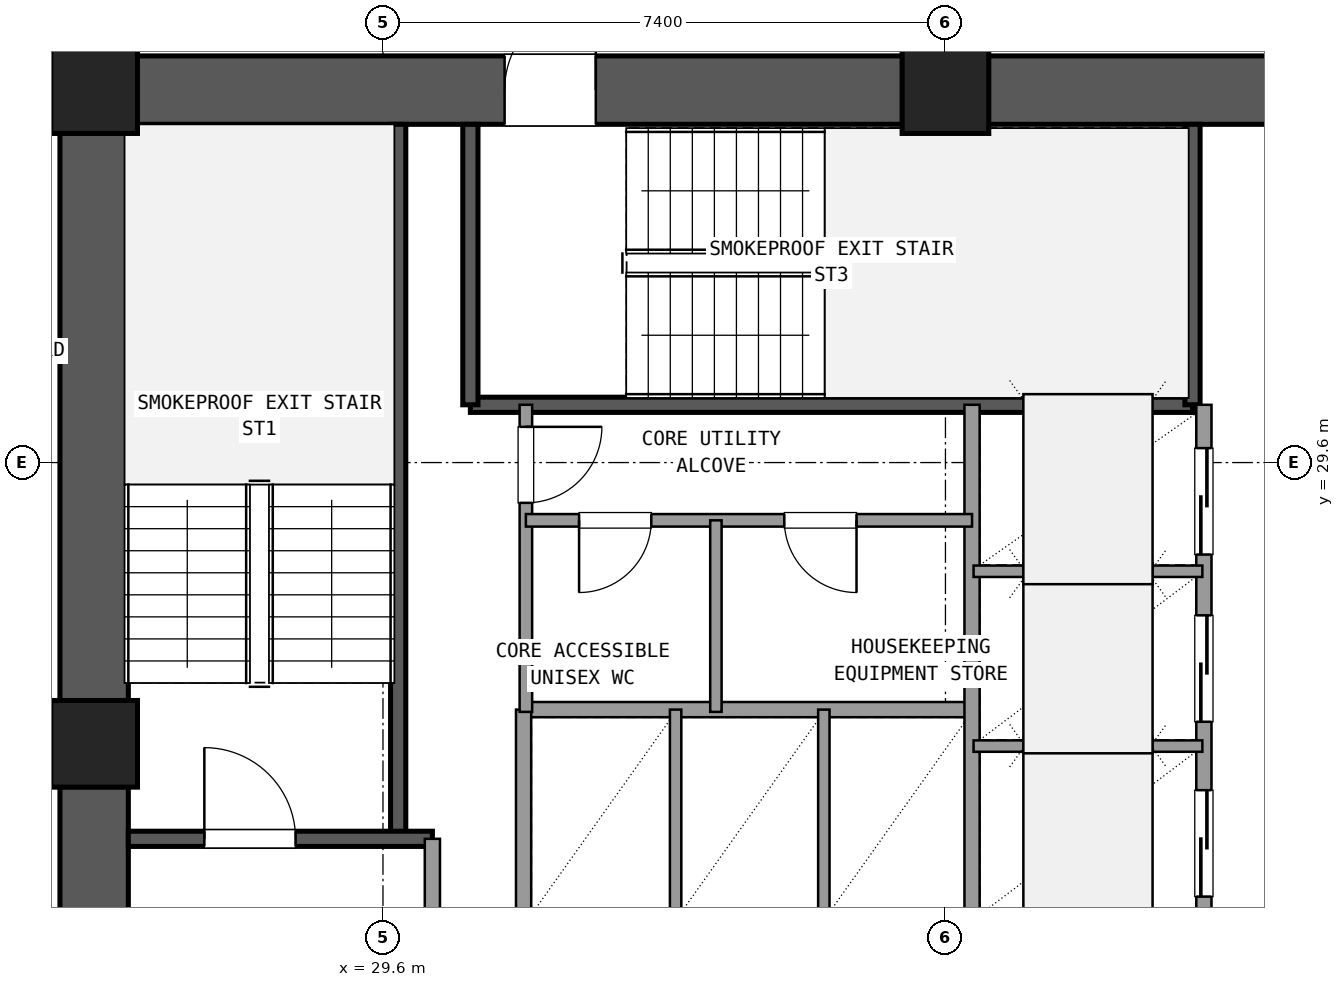
"""IFC4 building model, lengths in metres.
Left out: names, types, materials, properties, quantities, classifications, styles, units other than length and angle.
Written with IfcOpenShell. Run it as: python <this file> out.ifc"""

import sys

from ifc_helpers import new_model, si_unit, direction, frame, frame_2d, origin, origin_2d, place, context, subcontext, project, spatial, rectangle, extrude, element, fill, save


model = new_model("IFC4")
c1 = context("Model", 3, precision=1e-05, world=origin(), true_north=direction((0.0, 1.0)))
c2 = subcontext(c1, "Body", "Model", "MODEL_VIEW")
j1 = project(units=[si_unit("LENGTHUNIT", "METRE"), si_unit("PLANEANGLEUNIT", "RADIAN")], contexts=[c1])
p1 = place(None, origin())
s1 = spatial("IfcSite", under=j1, at=p1, CompositionType="ELEMENT")
p2 = place(p1, origin())
s2 = spatial("IfcBuilding", under=s1, at=p2, CompositionType="ELEMENT")
p3 = place(p2, frame((0.0, 0.0, 59.94)))
s3 = spatial("IfcBuildingStorey", under=s2, at=p3, CompositionType="ELEMENT", Elevation=59.94)
for number, where, z_axis, x_axis in (
    (1, (37.0, 34.5, 0.0), (0.0, 0.0, 1.0), (1.0, 0.0, 0.0)),
    (2, (25.8, 34.5, 0.0), (0.0, 0.0, 1.0), (1.0, 0.0, 0.0)),
    (3, (25.8, 25.9, 0.0), (0.0, 0.0, 1.0), (1.0, 0.0, 0.0)),
):
    element("IfcColumn", number, at=place(p3, frame(where, z_axis=z_axis, x_axis=x_axis)), inside=s3, PredefinedType="COLUMN", context=c2, shape_type="SweptSolid", body=[
        extrude(rectangle(XDim=1.14, YDim=1.14, at=origin_2d()), origin(), (0.0, 0.0, 1.0), 3.6),
    ])
p4 = place(p3, frame((47.635, 34.5, 0.0), z_axis=(0.0, 0.0, 1.0), x_axis=(-1.0, 0.0, 0.0)))
e4 = element("IfcWall", 4, at=p4, inside=s3, PredefinedType="SHEAR", context=c2, shape_type="SweptSolid", body=[
    extrude(rectangle(XDim=10.07, YDim=0.9, at=frame_2d((5.035, 0.0))), origin(), (0.0, 0.0, 1.0), 3.32),
])
p5 = place(p4, frame((4.535, 0.0, 0.0)))
e5 = element("IfcOpeningElement", 5, at=p5, cuts=e4, PredefinedType="OPENING", context=c2, shape_type="SweptSolid", body=[
    extrude(rectangle(XDim=1.6, YDim=2.2, at=frame_2d((0.8, 1.1))), frame((0.0, 0.46, 0.0), z_axis=(0.0, -1.0, 0.0), x_axis=(1.0, 0.0, 0.0)), (0.0, 0.0, 1.0), 0.92),
])
p6 = place(p3, frame((36.435, 34.5, 0.0), z_axis=(0.0, 0.0, 1.0), x_axis=(-1.0, 0.0, 0.0)))
e6 = element("IfcWall", 6, at=p6, inside=s3, PredefinedType="SHEAR", context=c2, shape_type="SweptSolid", body=[
    extrude(rectangle(XDim=10.07, YDim=0.9, at=frame_2d((5.035, 0.0))), origin(), (0.0, 0.0, 1.0), 3.32),
])
p7 = place(p6, frame((4.035, 0.0, 0.0)))
e7 = element("IfcOpeningElement", 7, at=p7, cuts=e6, PredefinedType="OPENING", context=c2, shape_type="SweptSolid", body=[
    extrude(rectangle(XDim=1.2, YDim=2.15, at=frame_2d((0.6, 1.075))), frame((0.0, 0.46, 0.0), z_axis=(0.0, -1.0, 0.0), x_axis=(1.0, 0.0, 0.0)), (0.0, 0.0, 1.0), 0.92),
])
p8 = place(p3, frame((25.8, 33.935, 0.0), z_axis=(0.0, 0.0, 1.0), x_axis=(0.0, -1.0, 0.0)))
e8 = element("IfcWall", 8, at=p8, inside=s3, PredefinedType="SHEAR", context=c2, shape_type="SweptSolid", body=[
    extrude(rectangle(XDim=7.47, YDim=0.9, at=frame_2d((3.735, 0.0))), origin(), (0.0, 0.0, 1.0), 3.32),
])
p9 = place(p3, frame((25.8, 25.335, 0.0), z_axis=(0.0, 0.0, 1.0), x_axis=(0.0, -1.0, 0.0)))
e9 = element("IfcWall", 9, at=p9, inside=s3, PredefinedType="SHEAR", context=c2, shape_type="SweptSolid", body=[
    extrude(rectangle(XDim=7.47, YDim=0.9, at=frame_2d((3.735, 0.0))), origin(), (0.0, 0.0, 1.0), 3.32),
])
p10 = place(p9, frame((2.085, 0.0, 0.0)))
e10 = element("IfcOpeningElement", 10, at=p10, cuts=e9, PredefinedType="OPENING", context=c2, shape_type="SweptSolid", body=[
    extrude(rectangle(XDim=1.2, YDim=2.15, at=frame_2d((0.6, 1.075))), frame((0.0, 0.46, 0.0), z_axis=(0.0, -1.0, 0.0), x_axis=(1.0, 0.0, 0.0)), (0.0, 0.0, 1.0), 0.92),
])
p11 = place(p3, frame((29.8, 24.65, 0.0), z_axis=(0.0, 0.0, 1.0), x_axis=(0.0, 1.0, 0.0)))
e11 = element("IfcWall", 11, at=p11, inside=s3, PredefinedType="SHEAR", context=c2, shape_type="SweptSolid", body=[
    extrude(rectangle(XDim=9.4, YDim=0.2, at=frame_2d((4.7, 0.0))), origin(), (0.0, 0.0, 1.0), 3.32),
])
p12 = place(p3, frame((26.25, 24.65, 0.0), z_axis=(0.0, 0.0, 1.0), x_axis=(1.0, 0.0, 0.0)))
e12 = element("IfcWall", 12, at=p12, inside=s3, PredefinedType="SHEAR", context=c2, shape_type="SweptSolid", body=[
    extrude(rectangle(XDim=4.0, YDim=0.2, at=frame_2d((2.0, 0.0))), origin(), (0.0, 0.0, 1.0), 3.32),
])
p13 = place(p12, frame((1.0, 0.0, 0.0)))
e13 = element("IfcOpeningElement", 13, at=p13, cuts=e12, PredefinedType="OPENING", context=c2, shape_type="SweptSolid", body=[
    extrude(rectangle(XDim=1.2, YDim=2.15, at=frame_2d((0.6, 1.075))), frame((0.0, 0.11, 0.0), z_axis=(0.0, -1.0, 0.0), x_axis=(1.0, 0.0, 0.0)), (0.0, 0.0, 1.0), 0.22),
])
p14 = place(p3, frame((30.75, 30.36, 0.0), z_axis=(0.0, 0.0, 1.0), x_axis=(1.0, 0.0, 0.0)))
e14 = element("IfcWall", 14, at=p14, inside=s3, PredefinedType="SHEAR", context=c2, shape_type="SweptSolid", body=[
    extrude(rectangle(XDim=9.5, YDim=0.2, at=frame_2d((4.75, 0.0))), origin(), (0.0, 0.0, 1.0), 3.32),
])
for number, where, z_axis, x_axis in (
    (15, (30.75, 30.36, 0.0), (0.0, 0.0, 1.0), (0.0, 1.0, 0.0)),
    (16, (40.25, 30.36, 0.0), (0.0, 0.0, 1.0), (0.0, 1.0, 0.0)),
):
    element("IfcWall", number, at=place(p3, frame(where, z_axis=z_axis, x_axis=x_axis)), inside=s3, PredefinedType="SHEAR", context=c2, shape_type="SweptSolid", body=[
        extrude(rectangle(XDim=3.69, YDim=0.2, at=frame_2d((1.845, 0.0))), origin(), (0.0, 0.0, 1.0), 3.32),
    ])
p15 = place(p3, frame((30.25, 17.75, 0.0), z_axis=(0.0, 0.0, 1.0), x_axis=(0.0, 1.0, 0.0)))
e17 = element("IfcWall", 17, at=p15, inside=s3, PredefinedType="SOLIDWALL", context=c2, shape_type="SweptSolid", body=[
    extrude(rectangle(XDim=6.9, YDim=0.2, at=frame_2d((3.45, 0.0))), origin(), (0.0, 0.0, 1.0), 2.61),
])
p16 = place(p15, frame((4.15, 0.0, 0.0)))
e18 = element("IfcOpeningElement", 18, at=p16, cuts=e17, PredefinedType="OPENING", context=c2, shape_type="SweptSolid", body=[
    extrude(rectangle(XDim=1.2, YDim=2.15, at=frame_2d((0.6, 1.075))), frame((0.0, 0.11, 0.0), z_axis=(0.0, -1.0, 0.0), x_axis=(1.0, 0.0, 0.0)), (0.0, 0.0, 1.0), 0.22),
])
p17 = place(p3, frame((31.45, 26.35, 0.0), z_axis=(0.0, 0.0, 1.0), x_axis=(1.0, 0.0, 0.0)))
e19 = element("IfcWall", 19, at=p17, inside=s3, PredefinedType="SOLIDWALL", context=c2, shape_type="SweptSolid", body=[
    extrude(rectangle(XDim=5.9, YDim=0.2, at=frame_2d((2.95, 0.0))), origin(), (0.0, 0.0, 1.0), 2.61),
])
p18 = place(p3, frame((31.45, 23.54, 0.0), z_axis=(0.0, 0.0, 1.0), x_axis=(0.0, 1.0, 0.0)))
e20 = element("IfcWall", 20, at=p18, inside=s3, PredefinedType="SOLIDWALL", context=c2, shape_type="SweptSolid", body=[
    extrude(rectangle(XDim=2.81, YDim=0.2, at=frame_2d((1.405, 0.0))), origin(), (0.0, 0.0, 1.0), 2.61),
])
for number, where, z_axis, x_axis in (
    (21, (33.45, 23.54, 0.0), (0.0, 0.0, 1.0), (0.0, 1.0, 0.0)),
    (22, (35.4, 23.54, 0.0), (0.0, 0.0, 1.0), (0.0, 1.0, 0.0)),
):
    element("IfcWall", number, at=place(p3, frame(where, z_axis=z_axis, x_axis=x_axis)), inside=s3, PredefinedType="PARTITIONING", context=c2, shape_type="SweptSolid", body=[
        extrude(rectangle(XDim=2.81, YDim=0.15, at=frame_2d((1.405, 0.0))), origin(), (0.0, 0.0, 1.0), 2.61),
    ])
p19 = place(p3, frame((37.35, 23.54, 0.0), z_axis=(0.0, 0.0, 1.0), x_axis=(0.0, 1.0, 0.0)))
e23 = element("IfcWall", 23, at=p19, inside=s3, PredefinedType="SOLIDWALL", context=c2, shape_type="SweptSolid", body=[
    extrude(rectangle(XDim=6.82, YDim=0.2, at=frame_2d((3.41, 0.0))), origin(), (0.0, 0.0, 1.0), 2.61),
])
p20 = place(p3, frame((40.4, 23.54, 0.0), z_axis=(0.0, 0.0, 1.0), x_axis=(0.0, 1.0, 0.0)))
e24 = element("IfcWall", 24, at=p20, inside=s3, PredefinedType="SOLIDWALL", context=c2, shape_type="SweptSolid", body=[
    extrude(rectangle(XDim=6.82, YDim=0.2, at=frame_2d((3.41, 0.0))), origin(), (0.0, 0.0, 1.0), 2.61),
])
p21 = place(p20, frame((0.35, 0.0, 0.0)))
e25 = element("IfcOpeningElement", 25, at=p21, cuts=e24, PredefinedType="OPENING", context=c2, shape_type="SweptSolid", body=[
    extrude(rectangle(XDim=1.4, YDim=2.2, at=frame_2d((0.7, 1.1))), frame((0.0, 0.11, 0.0), z_axis=(0.0, -1.0, 0.0), x_axis=(1.0, 0.0, 0.0)), (0.0, 0.0, 1.0), 0.22),
])
p22 = place(p20, frame((2.65, 0.0, 0.0)))
e26 = element("IfcOpeningElement", 26, at=p22, cuts=e24, PredefinedType="OPENING", context=c2, shape_type="SweptSolid", body=[
    extrude(rectangle(XDim=1.4, YDim=2.2, at=frame_2d((0.7, 1.1))), frame((0.0, 0.11, 0.0), z_axis=(0.0, -1.0, 0.0), x_axis=(1.0, 0.0, 0.0)), (0.0, 0.0, 1.0), 0.22),
])
p23 = place(p20, frame((4.85, 0.0, 0.0)))
e27 = element("IfcOpeningElement", 27, at=p23, cuts=e24, PredefinedType="OPENING", context=c2, shape_type="SweptSolid", body=[
    extrude(rectangle(XDim=1.4, YDim=2.2, at=frame_2d((0.7, 1.1))), frame((0.0, 0.11, 0.0), z_axis=(0.0, -1.0, 0.0), x_axis=(1.0, 0.0, 0.0)), (0.0, 0.0, 1.0), 0.22),
])
for number, where, z_axis, x_axis in (
    (28, (37.37, 25.87, 0.0), (0.0, 0.0, 1.0), (1.0, 0.0, 0.0)),
    (29, (37.37, 28.17, 0.0), (0.0, 0.0, 1.0), (1.0, 0.0, 0.0)),
):
    element("IfcWall", number, at=place(p3, frame(where, z_axis=z_axis, x_axis=x_axis)), inside=s3, PredefinedType="PARTITIONING", context=c2, shape_type="SweptSolid", body=[
        extrude(rectangle(XDim=3.01, YDim=0.15, at=frame_2d((1.505, 0.0))), origin(), (0.0, 0.0, 1.0), 2.61),
    ])
p24 = place(p3, frame((31.48, 26.32, 0.0), z_axis=(0.0, 0.0, 1.0), x_axis=(0.0, 1.0, 0.0)))
e30 = element("IfcWall", 30, at=p24, inside=s3, PredefinedType="PLUMBINGWALL", context=c2, shape_type="SweptSolid", body=[
    extrude(rectangle(XDim=4.04, YDim=0.165, at=frame_2d((2.02, 0.0))), origin(), (0.0, 0.0, 1.0), 2.61),
])
p25 = place(p24, frame((2.75, 0.0, 0.0)))
e31 = element("IfcOpeningElement", 31, at=p25, cuts=e30, PredefinedType="OPENING", context=c2, shape_type="SweptSolid", body=[
    extrude(rectangle(XDim=1.0, YDim=2.15, at=frame_2d((0.5, 1.075))), frame((0.0, 0.093, 0.0), z_axis=(0.0, -1.0, 0.0), x_axis=(1.0, 0.0, 0.0)), (0.0, 0.0, 1.0), 0.185),
])
p26 = place(p3, frame((31.48, 28.84, 0.0), z_axis=(0.0, 0.0, 1.0), x_axis=(1.0, 0.0, 0.0)))
e32 = element("IfcWall", 32, at=p26, inside=s3, PredefinedType="PLUMBINGWALL", context=c2, shape_type="SweptSolid", body=[
    extrude(rectangle(XDim=5.87, YDim=0.165, at=frame_2d((2.935, 0.0))), origin(), (0.0, 0.0, 1.0), 2.61),
])
p27 = place(p26, frame((0.7, 0.0, 0.0)))
e33 = element("IfcOpeningElement", 33, at=p27, cuts=e32, PredefinedType="OPENING", context=c2, shape_type="SweptSolid", body=[
    extrude(rectangle(XDim=0.95, YDim=2.1, at=frame_2d((0.475, 1.05))), frame((0.0, 0.093, 0.0), z_axis=(0.0, -1.0, 0.0), x_axis=(1.0, 0.0, 0.0)), (0.0, 0.0, 1.0), 0.185),
])
p28 = place(p26, frame((3.4, 0.0, 0.0)))
e34 = element("IfcOpeningElement", 34, at=p28, cuts=e32, PredefinedType="OPENING", context=c2, shape_type="SweptSolid", body=[
    extrude(rectangle(XDim=0.95, YDim=2.1, at=frame_2d((0.475, 1.05))), frame((0.0, 0.093, 0.0), z_axis=(0.0, -1.0, 0.0), x_axis=(1.0, 0.0, 0.0)), (0.0, 0.0, 1.0), 0.185),
])
p29 = place(p3, frame((33.98, 26.32, 0.0), z_axis=(0.0, 0.0, 1.0), x_axis=(0.0, 1.0, 0.0)))
e35 = element("IfcWall", 35, at=p29, inside=s3, PredefinedType="PARTITIONING", context=c2, shape_type="SweptSolid", body=[
    extrude(rectangle(XDim=2.52, YDim=0.15, at=frame_2d((1.26, 0.0))), origin(), (0.0, 0.0, 1.0), 2.61),
])
p30 = place(p3, frame((37.0, 34.95, 0.0), z_axis=(0.0, 0.0, 1.0), x_axis=(0.0, 1.0, 0.0)))
e36 = element("IfcWall", 36, at=p30, inside=s3, PredefinedType="PARTITIONING", context=c2, shape_type="SweptSolid", body=[
    extrude(rectangle(XDim=2.7, YDim=0.18, at=frame_2d((1.35, 0.0))), origin(), (0.0, 0.0, 1.0), 2.61),
])
p31 = place(p30, frame((0.35, 0.0, 0.0)))
e37 = element("IfcOpeningElement", 37, at=p31, cuts=e36, PredefinedType="OPENING", context=c2, shape_type="SweptSolid", body=[
    extrude(rectangle(XDim=2.0, YDim=2.2, at=frame_2d((1.0, 1.1))), frame((0.0, 0.1, 0.0), z_axis=(0.0, -1.0, 0.0), x_axis=(1.0, 0.0, 0.0)), (0.0, 0.0, 1.0), 0.2),
])
p32 = place(p13, origin())
e38 = element("IfcDoor", 38, at=p32, inside=s3, OperationType="SINGLE_SWING_LEFT", PredefinedType="DOOR", context=c2, shape_type="SweptSolid", body=[
    extrude(rectangle(XDim=1.2, YDim=2.15, at=frame_2d((0.6, 1.075))), frame((0.0, 0.025, 0.0), z_axis=(0.0, -1.0, 0.0), x_axis=(1.0, 0.0, 0.0)), (0.0, 0.0, 1.0), 0.05),
])
fill(e13, e38)
p33 = place(p7, frame((1.2, 0.0, 0.0), z_axis=(0.0, 0.0, 1.0), x_axis=(-1.0, 0.0, 0.0)))
e39 = element("IfcDoor", 39, at=p33, inside=s3, OperationType="SINGLE_SWING_LEFT", PredefinedType="DOOR", context=c2, shape_type="SweptSolid", body=[
    extrude(rectangle(XDim=1.2, YDim=2.15, at=frame_2d((0.6, 1.075))), frame((0.0, 0.025, 0.0), z_axis=(0.0, -1.0, 0.0), x_axis=(1.0, 0.0, 0.0)), (0.0, 0.0, 1.0), 0.05),
])
fill(e7, e39)
p34 = place(p21, origin())
e40 = element("IfcDoor", 40, at=p34, inside=s3, OperationType="SLIDING_TO_LEFT", PredefinedType="DOOR", context=c2, shape_type="SweptSolid", body=[
    extrude(rectangle(XDim=1.4, YDim=2.2, at=frame_2d((0.7, 1.1))), frame((0.0, 0.025, 0.0), z_axis=(0.0, -1.0, 0.0), x_axis=(1.0, 0.0, 0.0)), (0.0, 0.0, 1.0), 0.05),
])
fill(e25, e40)
p35 = place(p22, origin())
e41 = element("IfcDoor", 41, at=p35, inside=s3, OperationType="SLIDING_TO_LEFT", PredefinedType="DOOR", context=c2, shape_type="SweptSolid", body=[
    extrude(rectangle(XDim=1.4, YDim=2.2, at=frame_2d((0.7, 1.1))), frame((0.0, 0.025, 0.0), z_axis=(0.0, -1.0, 0.0), x_axis=(1.0, 0.0, 0.0)), (0.0, 0.0, 1.0), 0.05),
])
fill(e26, e41)
p36 = place(p23, origin())
e42 = element("IfcDoor", 42, at=p36, inside=s3, OperationType="SLIDING_TO_RIGHT", PredefinedType="DOOR", context=c2, shape_type="SweptSolid", body=[
    extrude(rectangle(XDim=1.4, YDim=2.2, at=frame_2d((0.7, 1.1))), frame((0.0, 0.025, 0.0), z_axis=(0.0, -1.0, 0.0), x_axis=(1.0, 0.0, 0.0)), (0.0, 0.0, 1.0), 0.05),
])
fill(e27, e42)
p37 = place(p25, frame((1.0, 0.0, 0.0), z_axis=(0.0, 0.0, 1.0), x_axis=(-1.0, 0.0, 0.0)))
e43 = element("IfcDoor", 43, at=p37, inside=s3, OperationType="SINGLE_SWING_RIGHT", PredefinedType="DOOR", context=c2, shape_type="SweptSolid", body=[
    extrude(rectangle(XDim=1.0, YDim=2.15, at=frame_2d((0.5, 1.075))), frame((0.0, 0.025, 0.0), z_axis=(0.0, -1.0, 0.0), x_axis=(1.0, 0.0, 0.0)), (0.0, 0.0, 1.0), 0.05),
])
fill(e31, e43)
p38 = place(p27, frame((0.95, 0.0, 0.0), z_axis=(0.0, 0.0, 1.0), x_axis=(-1.0, 0.0, 0.0)))
e44 = element("IfcDoor", 44, at=p38, inside=s3, OperationType="SINGLE_SWING_LEFT", PredefinedType="DOOR", context=c2, shape_type="SweptSolid", body=[
    extrude(rectangle(XDim=0.95, YDim=2.1, at=frame_2d((0.475, 1.05))), frame((0.0, 0.025, 0.0), z_axis=(0.0, -1.0, 0.0), x_axis=(1.0, 0.0, 0.0)), (0.0, 0.0, 1.0), 0.05),
])
fill(e33, e44)
p39 = place(p28, frame((0.95, 0.0, 0.0), z_axis=(0.0, 0.0, 1.0), x_axis=(-1.0, 0.0, 0.0)))
e45 = element("IfcDoor", 45, at=p39, inside=s3, OperationType="SINGLE_SWING_RIGHT", PredefinedType="DOOR", context=c2, shape_type="SweptSolid", body=[
    extrude(rectangle(XDim=0.95, YDim=2.1, at=frame_2d((0.475, 1.05))), frame((0.0, 0.025, 0.0), z_axis=(0.0, -1.0, 0.0), x_axis=(1.0, 0.0, 0.0)), (0.0, 0.0, 1.0), 0.05),
])
fill(e34, e45)
save(model, sys.argv[1])
